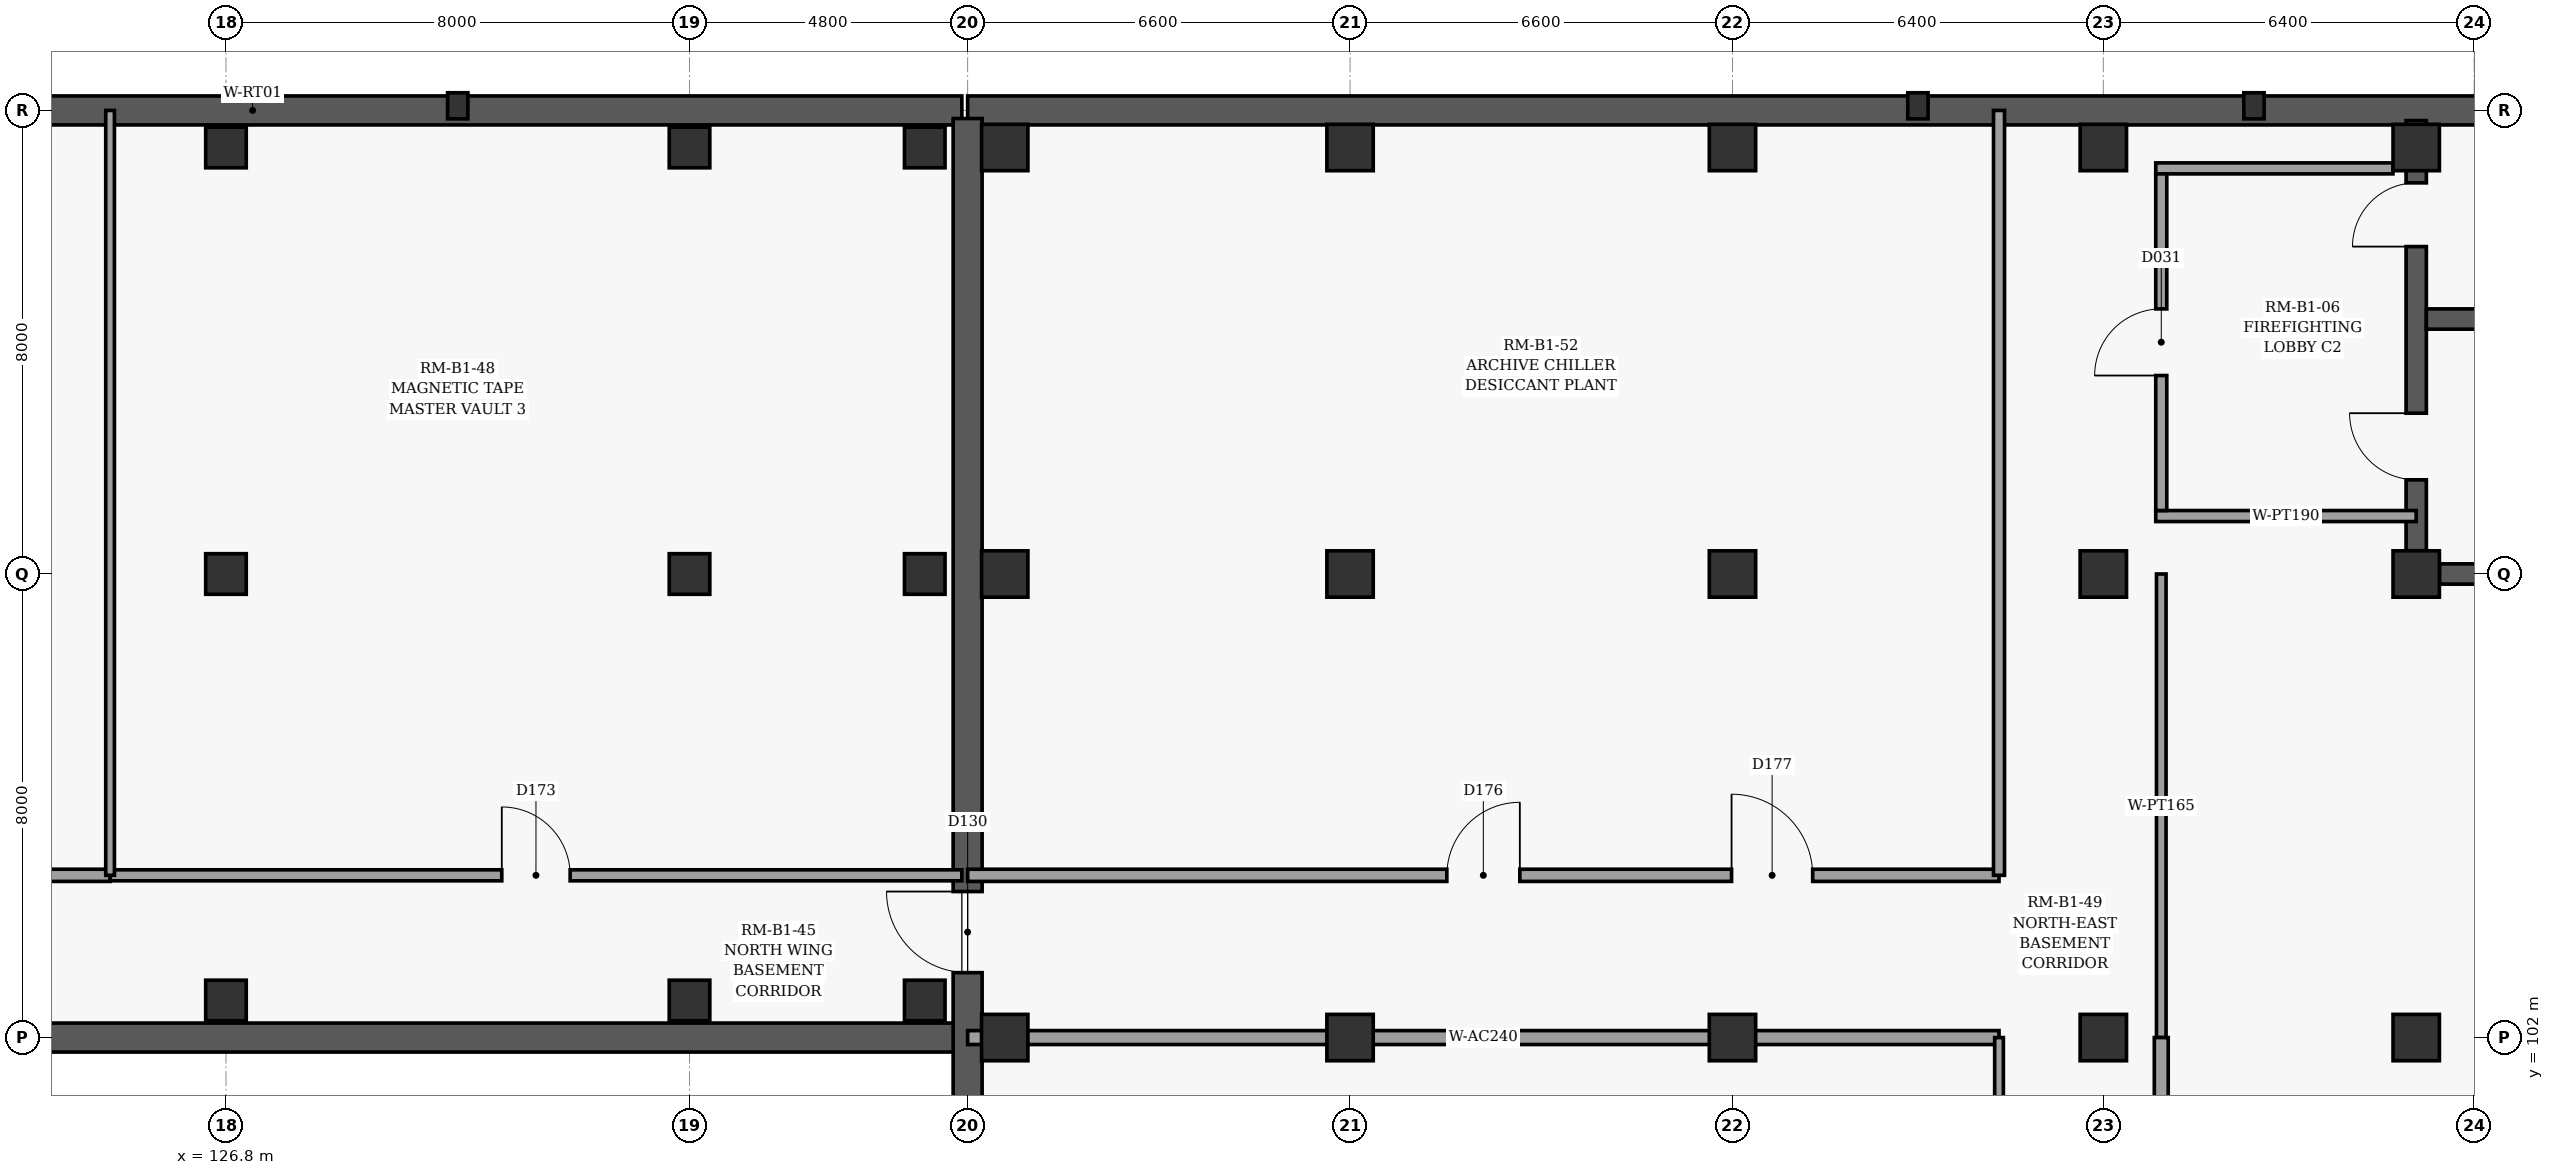
"""IFC4 building model, lengths in metres.
Left out: names, types, materials, properties, quantities, classifications, styles, units other than length and angle.
Written with IfcOpenShell. Run it as: python <this file> out.ifc"""

import sys

from ifc_helpers import new_model, si_unit, direction, frame, frame_2d, origin, origin_2d, place, context, subcontext, project, spatial, rectangle, extrude, element, fill, save


model = new_model("IFC4")
c1 = context("Model", 3, precision=1e-05, world=origin(), true_north=direction((0.0, 1.0)))
c2 = subcontext(c1, "Body", "Model", "MODEL_VIEW")
j1 = project(units=[si_unit("LENGTHUNIT", "METRE"), si_unit("PLANEANGLEUNIT", "RADIAN")], contexts=[c1])
p1 = place(None, origin())
s1 = spatial("IfcSite", under=j1, at=p1, CompositionType="ELEMENT")
p2 = place(p1, origin())
s2 = spatial("IfcBuilding", under=s1, at=p2, CompositionType="ELEMENT")
p3 = place(p2, frame((0.0, 0.0, -4.8)))
s3 = spatial("IfcBuildingStorey", under=s2, at=p3, CompositionType="ELEMENT", Elevation=-4.8)
for number, where, z_axis, x_axis in (
    (1, (126.8, 102.64, 0.0), (0.0, 0.0, 1.0), (1.0, 0.0, 0.0)),
    (2, (126.8, 110.0, 0.0), (0.0, 0.0, 1.0), (1.0, 0.0, 0.0)),
    (3, (126.8, 117.36, 0.0), (0.0, 0.0, 1.0), (1.0, 0.0, 0.0)),
    (4, (134.8, 102.64, 0.0), (0.0, 0.0, 1.0), (1.0, 0.0, 0.0)),
    (5, (134.8, 110.0, 0.0), (0.0, 0.0, 1.0), (1.0, 0.0, 0.0)),
    (6, (134.8, 117.36, 0.0), (0.0, 0.0, 1.0), (1.0, 0.0, 0.0)),
    (7, (138.86, 102.64, 0.0), (0.0, 0.0, 1.0), (1.0, 0.0, 0.0)),
    (8, (138.86, 110.0, 0.0), (0.0, 0.0, 1.0), (1.0, 0.0, 0.0)),
    (9, (138.86, 117.36, 0.0), (0.0, 0.0, 1.0), (1.0, 0.0, 0.0)),
):
    element("IfcColumn", number, at=place(p3, frame(where, z_axis=z_axis, x_axis=x_axis)), inside=s3, PredefinedType="COLUMN", context=c2, shape_type="SweptSolid", body=[
        extrude(rectangle(XDim=0.7, YDim=0.7, at=origin_2d()), origin(), (0.0, 0.0, 1.0), 4.8),
    ])
for number, where, z_axis, x_axis in (
    (10, (140.24, 102.0, 0.0), (0.0, 0.0, 1.0), (1.0, 0.0, 0.0)),
    (11, (140.24, 110.0, 0.0), (0.0, 0.0, 1.0), (1.0, 0.0, 0.0)),
    (12, (140.24, 117.36, 0.0), (0.0, 0.0, 1.0), (1.0, 0.0, 0.0)),
    (13, (146.2, 102.0, 0.0), (0.0, 0.0, 1.0), (1.0, 0.0, 0.0)),
    (14, (146.2, 110.0, 0.0), (0.0, 0.0, 1.0), (1.0, 0.0, 0.0)),
    (15, (146.2, 117.36, 0.0), (0.0, 0.0, 1.0), (1.0, 0.0, 0.0)),
    (16, (152.8, 102.0, 0.0), (0.0, 0.0, 1.0), (1.0, 0.0, 0.0)),
    (17, (152.8, 110.0, 0.0), (0.0, 0.0, 1.0), (1.0, 0.0, 0.0)),
    (18, (152.8, 117.36, 0.0), (0.0, 0.0, 1.0), (1.0, 0.0, 0.0)),
    (19, (159.2, 102.0, 0.0), (0.0, 0.0, 1.0), (1.0, 0.0, 0.0)),
    (20, (159.2, 110.0, 0.0), (0.0, 0.0, 1.0), (1.0, 0.0, 0.0)),
    (21, (159.2, 117.36, 0.0), (0.0, 0.0, 1.0), (1.0, 0.0, 0.0)),
    (22, (164.6, 102.0, 0.0), (0.0, 0.0, 1.0), (1.0, 0.0, 0.0)),
    (23, (164.6, 110.0, 0.0), (0.0, 0.0, 1.0), (1.0, 0.0, 0.0)),
    (24, (164.6, 117.36, 0.0), (0.0, 0.0, 1.0), (1.0, 0.0, 0.0)),
):
    element("IfcColumn", number, at=place(p3, frame(where, z_axis=z_axis, x_axis=x_axis)), inside=s3, PredefinedType="COLUMN", context=c2, shape_type="SweptSolid", body=[
        extrude(rectangle(XDim=0.8, YDim=0.8, at=origin_2d()), origin(), (0.0, 0.0, 1.0), 4.8),
    ])
p4 = place(p3, frame((130.8, 118.08, -0.5), z_axis=(0.0, 0.0, 1.0), x_axis=(0.0, 1.0, 0.0)))
e25 = element("IfcColumn", 25, at=p4, inside=s3, PredefinedType="PILASTER", context=c2, shape_type="SweptSolid", body=[
    extrude(rectangle(XDim=0.35, YDim=0.45, at=origin_2d()), origin(), (0.0, 0.0, 1.0), 5.3),
])
for number, where, z_axis, x_axis in (
    (26, (156.0, 118.08, -0.48), (0.0, 0.0, 1.0), (0.0, 1.0, 0.0)),
    (27, (161.8, 118.08, -0.48), (0.0, 0.0, 1.0), (0.0, 1.0, 0.0)),
):
    element("IfcColumn", number, at=place(p3, frame(where, z_axis=z_axis, x_axis=x_axis)), inside=s3, PredefinedType="PILASTER", context=c2, shape_type="SweptSolid", body=[
        extrude(rectangle(XDim=0.35, YDim=0.45, at=origin_2d()), origin(), (0.0, 0.0, 1.0), 5.28),
    ])
for number, where, z_axis, x_axis in (
    (28, (94.8, 118.0, 0.0), (0.0, 0.0, 1.0), (1.0, 0.0, 0.0)),
    (29, (139.5, 102.0, 0.0), (0.0, 0.0, 1.0), (-1.0, 0.0, 0.0)),
):
    element("IfcWall", number, at=place(p3, frame(where, z_axis=z_axis, x_axis=x_axis)), inside=s3, PredefinedType="USERDEFINED", context=c2, shape_type="SweptSolid", body=[
        extrude(rectangle(XDim=44.7, YDim=0.5, at=frame_2d((22.35, 0.0))), origin(), (0.0, 0.0, 1.0), 4.45),
    ])
p5 = place(p3, frame((139.6, 118.0, 0.0), z_axis=(0.0, 0.0, 1.0), x_axis=(1.0, 0.0, 0.0)))
e30 = element("IfcWall", 30, at=p5, inside=s3, PredefinedType="USERDEFINED", context=c2, shape_type="SweptSolid", body=[
    extrude(rectangle(XDim=32.4, YDim=0.5, at=frame_2d((16.2, 0.0))), origin(), (0.0, 0.0, 1.0), 4.5),
])
p6 = place(p3, frame((139.6, 71.74, 0.0), z_axis=(0.0, 0.0, 1.0), x_axis=(0.0, 1.0, 0.0)))
e31 = element("IfcWall", 31, at=p6, inside=s3, PredefinedType="USERDEFINED", context=c2, shape_type="SweptSolid", body=[
    extrude(rectangle(XDim=46.12, YDim=0.5, at=frame_2d((23.06, 0.0))), origin(), (0.0, 0.0, 1.0), 3.67),
])
p7 = place(p6, frame((31.38, 0.0, 0.0)))
e32 = element("IfcOpeningElement", 32, at=p7, cuts=e31, PredefinedType="OPENING", context=c2, shape_type="SweptSolid", body=[
    extrude(rectangle(XDim=1.4, YDim=2.25, at=frame_2d((0.7, 1.125))), frame((0.0, 0.26, 0.0), z_axis=(0.0, -1.0, 0.0), x_axis=(1.0, 0.0, 0.0)), (0.0, 0.0, 1.0), 0.52),
])
p8 = place(p3, frame((165.002, 110.0, 0.0), z_axis=(0.0, 0.0, 1.0), x_axis=(1.0, 0.0, 0.0)))
e33 = element("IfcWall", 33, at=p8, inside=s3, PredefinedType="SHEAR", context=c2, shape_type="SweptSolid", body=[
    extrude(rectangle(XDim=7.173, YDim=0.35, at=frame_2d((3.586, 0.0))), origin(), (0.0, 0.0, 1.0), 4.5),
])
p9 = place(p3, frame((164.6, 110.402, 0.0), z_axis=(0.0, 0.0, 1.0), x_axis=(0.0, 1.0, 0.0)))
e34 = element("IfcWall", 34, at=p9, inside=s3, PredefinedType="SHEAR", context=c2, shape_type="SweptSolid", body=[
    extrude(rectangle(XDim=7.423, YDim=0.35, at=frame_2d((3.711, 0.0))), origin(), (0.0, 0.0, 1.0), 4.5),
])
p10 = place(p9, frame((5.248, 0.0, 0.0)))
e35 = element("IfcOpeningElement", 35, at=p10, cuts=e34, PredefinedType="OPENING", context=c2, shape_type="SweptSolid", body=[
    extrude(rectangle(XDim=1.1, YDim=2.15, at=frame_2d((0.55, 1.075))), frame((0.0, 0.185, 0.0), z_axis=(0.0, -1.0, 0.0), x_axis=(1.0, 0.0, 0.0)), (0.0, 0.0, 1.0), 0.37),
])
p11 = place(p9, frame((1.223, 0.0, 0.0)))
e36 = element("IfcOpeningElement", 36, at=p11, cuts=e34, PredefinedType="OPENING", context=c2, shape_type="SweptSolid", body=[
    extrude(rectangle(XDim=1.15, YDim=2.2, at=frame_2d((0.575, 1.1))), frame((0.0, 0.185, 0.0), z_axis=(0.0, -1.0, 0.0), x_axis=(1.0, 0.0, 0.0)), (0.0, 0.0, 1.0), 0.37),
])
p12 = place(p3, frame((164.775, 114.4, 0.0), z_axis=(0.0, 0.0, 1.0), x_axis=(1.0, 0.0, 0.0)))
e37 = element("IfcWall", 37, at=p12, inside=s3, PredefinedType="SHEAR", context=c2, shape_type="SweptSolid", body=[
    extrude(rectangle(XDim=7.05, YDim=0.35, at=frame_2d((3.525, 0.0))), origin(), (0.0, 0.0, 1.0), 4.5),
])
p13 = place(p3, frame((160.105, 111.0, 0.0), z_axis=(0.0, 0.0, 1.0), x_axis=(1.0, 0.0, 0.0)))
e38 = element("IfcWall", 38, at=p13, inside=s3, PredefinedType="PARTITIONING", context=c2, shape_type="SweptSolid", body=[
    extrude(rectangle(XDim=4.495, YDim=0.19, at=frame_2d((2.248, 0.0))), origin(), (0.0, 0.0, 1.0), 4.5),
])
p14 = place(p3, frame((160.105, 117.0, 0.0), z_axis=(0.0, 0.0, 1.0), x_axis=(1.0, 0.0, 0.0)))
e39 = element("IfcWall", 39, at=p14, inside=s3, PredefinedType="PARTITIONING", context=c2, shape_type="SweptSolid", body=[
    extrude(rectangle(XDim=4.093, YDim=0.19, at=frame_2d((2.046, 0.0))), origin(), (0.0, 0.0, 1.0), 3.85),
])
p15 = place(p3, frame((160.2, 111.095, 0.0), z_axis=(0.0, 0.0, 1.0), x_axis=(0.0, 1.0, 0.0)))
e40 = element("IfcWall", 40, at=p15, inside=s3, PredefinedType="PARTITIONING", context=c2, shape_type="SweptSolid", body=[
    extrude(rectangle(XDim=5.81, YDim=0.19, at=frame_2d((2.905, 0.0))), origin(), (0.0, 0.0, 1.0), 4.5),
])
p16 = place(p15, frame((2.33, 0.0, 0.0)))
e41 = element("IfcOpeningElement", 41, at=p16, cuts=e40, PredefinedType="OPENING", context=c2, shape_type="SweptSolid", body=[
    extrude(rectangle(XDim=1.15, YDim=2.2, at=frame_2d((0.575, 1.1))), frame((0.0, 0.105, 0.0), z_axis=(0.0, -1.0, 0.0), x_axis=(1.0, 0.0, 0.0)), (0.0, 0.0, 1.0), 0.21),
])
p17 = place(p3, frame((109.8, 104.8, 0.0), z_axis=(0.0, 0.0, 1.0), x_axis=(1.0, 0.0, 0.0)))
e42 = element("IfcWall", 42, at=p17, inside=s3, PredefinedType="PARTITIONING", context=c2, shape_type="SweptSolid", body=[
    extrude(rectangle(XDim=15.0, YDim=0.21, at=frame_2d((7.5, 0.0))), origin(), (0.0, 0.0, 1.0), 4.45),
])
p18 = place(p17, frame((6.94, 0.0, 0.0)))
e43 = element("IfcOpeningElement", 43, at=p18, cuts=e42, PredefinedType="OPENING", context=c2, shape_type="SweptSolid", body=[
    extrude(rectangle(XDim=1.12, YDim=2.15, at=frame_2d((0.56, 1.075))), frame((0.0, 0.115, 0.0), z_axis=(0.0, -1.0, 0.0), x_axis=(1.0, 0.0, 0.0)), (0.0, 0.0, 1.0), 0.23),
])
p19 = place(p3, frame((124.8, 104.8, 0.0), z_axis=(0.0, 0.0, 1.0), x_axis=(1.0, 0.0, 0.0)))
e44 = element("IfcWall", 44, at=p19, inside=s3, PredefinedType="PARTITIONING", context=c2, shape_type="SweptSolid", body=[
    extrude(rectangle(XDim=14.7, YDim=0.19, at=frame_2d((7.35, 0.0))), origin(), (0.0, 0.0, 1.0), 4.45),
])
p20 = place(p19, frame((6.76, 0.0, 0.0)))
e45 = element("IfcOpeningElement", 45, at=p20, cuts=e44, PredefinedType="OPENING", context=c2, shape_type="SweptSolid", body=[
    extrude(rectangle(XDim=1.18, YDim=2.15, at=frame_2d((0.59, 1.075))), frame((0.0, 0.105, 0.0), z_axis=(0.0, -1.0, 0.0), x_axis=(1.0, 0.0, 0.0)), (0.0, 0.0, 1.0), 0.21),
])
p21 = place(p3, frame((124.8, 118.0, 0.0), z_axis=(0.0, 0.0, 1.0), x_axis=(0.0, -1.0, 0.0)))
e46 = element("IfcWall", 46, at=p21, inside=s3, PredefinedType="PARTITIONING", context=c2, shape_type="SweptSolid", body=[
    extrude(rectangle(XDim=13.2, YDim=0.15, at=frame_2d((6.6, 0.0))), origin(), (0.0, 0.0, 1.0), 4.45),
])
p22 = place(p3, frame((157.4, 102.0, 0.0), z_axis=(0.0, 0.0, 1.0), x_axis=(-1.0, 0.0, 0.0)))
e47 = element("IfcWall", 47, at=p22, inside=s3, PredefinedType="PARTITIONING", context=c2, shape_type="SweptSolid", body=[
    extrude(rectangle(XDim=17.8, YDim=0.24, at=frame_2d((8.9, 0.0))), origin(), (0.0, 0.0, 1.0), 3.85),
])
p23 = place(p3, frame((139.6, 104.8, 0.0), z_axis=(0.0, 0.0, 1.0), x_axis=(1.0, 0.0, 0.0)))
e48 = element("IfcWall", 48, at=p23, inside=s3, PredefinedType="PARTITIONING", context=c2, shape_type="SweptSolid", body=[
    extrude(rectangle(XDim=17.8, YDim=0.21, at=frame_2d((8.9, 0.0))), origin(), (0.0, 0.0, 1.0), 4.5),
])
p24 = place(p23, frame((8.27, 0.0, 0.0)))
e49 = element("IfcOpeningElement", 49, at=p24, cuts=e48, PredefinedType="OPENING", context=c2, shape_type="SweptSolid", body=[
    extrude(rectangle(XDim=1.26, YDim=2.2, at=frame_2d((0.63, 1.1))), frame((0.0, 0.115, 0.0), z_axis=(0.0, -1.0, 0.0), x_axis=(1.0, 0.0, 0.0)), (0.0, 0.0, 1.0), 0.23),
])
p25 = place(p23, frame((13.184, 0.0, 0.0)))
e50 = element("IfcOpeningElement", 50, at=p25, cuts=e48, PredefinedType="OPENING", context=c2, shape_type="SweptSolid", body=[
    extrude(rectangle(XDim=1.4, YDim=2.25, at=frame_2d((0.7, 1.125))), frame((0.0, 0.115, 0.0), z_axis=(0.0, -1.0, 0.0), x_axis=(1.0, 0.0, 0.0)), (0.0, 0.0, 1.0), 0.23),
])
p26 = place(p3, frame((157.4, 104.8, 0.0), z_axis=(0.0, 0.0, 1.0), x_axis=(0.0, 1.0, 0.0)))
e51 = element("IfcWall", 51, at=p26, inside=s3, PredefinedType="PARTITIONING", context=c2, shape_type="SweptSolid", body=[
    extrude(rectangle(XDim=13.2, YDim=0.19, at=frame_2d((6.6, 0.0))), origin(), (0.0, 0.0, 1.0), 4.5),
])
p27 = place(p3, frame((160.2, 110.0, 0.0), z_axis=(0.0, 0.0, 1.0), x_axis=(0.0, -1.0, 0.0)))
e52 = element("IfcWall", 52, at=p27, inside=s3, PredefinedType="PARTITIONING", context=c2, shape_type="SweptSolid", body=[
    extrude(rectangle(XDim=8.0, YDim=0.165, at=frame_2d((4.0, 0.0))), origin(), (0.0, 0.0, 1.0), 4.5),
])
p28 = place(p3, frame((157.4, 71.6, 0.0), z_axis=(0.0, 0.0, 1.0), x_axis=(0.0, 1.0, 0.0)))
e53 = element("IfcWall", 53, at=p28, inside=s3, PredefinedType="PARTITIONING", context=c2, shape_type="SweptSolid", body=[
    extrude(rectangle(XDim=30.4, YDim=0.15, at=frame_2d((15.2, 0.0))), origin(), (0.0, 0.0, 1.0), 4.5),
])
p29 = place(p28, frame((14.18, 0.0, 0.0)))
e54 = element("IfcOpeningElement", 54, at=p29, cuts=e53, PredefinedType="OPENING", context=c2, shape_type="SweptSolid", body=[
    extrude(rectangle(XDim=1.22, YDim=2.2, at=frame_2d((0.61, 1.1))), frame((0.0, 0.085, 0.0), z_axis=(0.0, -1.0, 0.0), x_axis=(1.0, 0.0, 0.0)), (0.0, 0.0, 1.0), 0.17),
])
p30 = place(p28, frame((23.102, 0.0, 0.0)))
e55 = element("IfcOpeningElement", 55, at=p30, cuts=e53, PredefinedType="OPENING", context=c2, shape_type="SweptSolid", body=[
    extrude(rectangle(XDim=1.22, YDim=2.2, at=frame_2d((0.61, 1.1))), frame((0.0, 0.085, 0.0), z_axis=(0.0, -1.0, 0.0), x_axis=(1.0, 0.0, 0.0)), (0.0, 0.0, 1.0), 0.17),
])
p31 = place(p3, frame((160.2, 102.0, 0.0), z_axis=(0.0, 0.0, 1.0), x_axis=(0.0, -1.0, 0.0)))
e56 = element("IfcWall", 56, at=p31, inside=s3, PredefinedType="PARTITIONING", context=c2, shape_type="SweptSolid", body=[
    extrude(rectangle(XDim=22.4, YDim=0.24, at=frame_2d((11.2, 0.0))), origin(), (0.0, 0.0, 1.0), 4.5),
])
p32 = place(p31, frame((10.55, 0.0, 0.0)))
e57 = element("IfcOpeningElement", 57, at=p32, cuts=e56, PredefinedType="OPENING", context=c2, shape_type="SweptSolid", body=[
    extrude(rectangle(XDim=1.3, YDim=2.2, at=frame_2d((0.65, 1.1))), frame((0.0, 0.13, 0.0), z_axis=(0.0, -1.0, 0.0), x_axis=(1.0, 0.0, 0.0)), (0.0, 0.0, 1.0), 0.26),
])
p33 = place(p31, frame((16.772, 0.0, 0.0)))
e58 = element("IfcOpeningElement", 58, at=p33, cuts=e56, PredefinedType="OPENING", context=c2, shape_type="SweptSolid", body=[
    extrude(rectangle(XDim=1.4, YDim=2.25, at=frame_2d((0.7, 1.125))), frame((0.0, 0.13, 0.0), z_axis=(0.0, -1.0, 0.0), x_axis=(1.0, 0.0, 0.0)), (0.0, 0.0, 1.0), 0.26),
])
p34 = place(p10, origin())
e59 = element("IfcDoor", 59, at=p34, inside=s3, OperationType="SINGLE_SWING_LEFT", PredefinedType="DOOR", context=c2, shape_type="SweptSolid", body=[
    extrude(rectangle(XDim=1.1, YDim=2.15, at=frame_2d((0.55, 1.075))), frame((0.0, 0.025, 0.0), z_axis=(0.0, -1.0, 0.0), x_axis=(1.0, 0.0, 0.0)), (0.0, 0.0, 1.0), 0.05),
])
fill(e35, e59)
p35 = place(p11, origin())
e60 = element("IfcDoor", 60, at=p35, inside=s3, OperationType="SINGLE_SWING_RIGHT", PredefinedType="DOOR", context=c2, shape_type="SweptSolid", body=[
    extrude(rectangle(XDim=1.15, YDim=2.2, at=frame_2d((0.575, 1.1))), frame((0.0, 0.025, 0.0), z_axis=(0.0, -1.0, 0.0), x_axis=(1.0, 0.0, 0.0)), (0.0, 0.0, 1.0), 0.05),
])
fill(e36, e60)
p36 = place(p16, origin())
e61 = element("IfcDoor", 61, at=p36, inside=s3, OperationType="SINGLE_SWING_LEFT", PredefinedType="DOOR", context=c2, shape_type="SweptSolid", body=[
    extrude(rectangle(XDim=1.15, YDim=2.2, at=frame_2d((0.575, 1.1))), frame((0.0, 0.025, 0.0), z_axis=(0.0, -1.0, 0.0), x_axis=(1.0, 0.0, 0.0)), (0.0, 0.0, 1.0), 0.05),
])
fill(e41, e61)
p37 = place(p7, origin())
e62 = element("IfcDoor", 62, at=p37, inside=s3, OperationType="SINGLE_SWING_RIGHT", PredefinedType="DOOR", context=c2, shape_type="SweptSolid", body=[
    extrude(rectangle(XDim=1.4, YDim=2.25, at=frame_2d((0.7, 1.125))), frame((0.0, 0.025, 0.0), z_axis=(0.0, -1.0, 0.0), x_axis=(1.0, 0.0, 0.0)), (0.0, 0.0, 1.0), 0.05),
])
fill(e32, e62)
p38 = place(p20, origin())
e63 = element("IfcDoor", 63, at=p38, inside=s3, OperationType="SINGLE_SWING_LEFT", PredefinedType="DOOR", context=c2, shape_type="SweptSolid", body=[
    extrude(rectangle(XDim=1.18, YDim=2.15, at=frame_2d((0.59, 1.075))), frame((0.0, 0.025, 0.0), z_axis=(0.0, -1.0, 0.0), x_axis=(1.0, 0.0, 0.0)), (0.0, 0.0, 1.0), 0.05),
])
fill(e45, e63)
p39 = place(p24, origin())
e64 = element("IfcDoor", 64, at=p39, inside=s3, OperationType="SINGLE_SWING_RIGHT", PredefinedType="DOOR", context=c2, shape_type="SweptSolid", body=[
    extrude(rectangle(XDim=1.26, YDim=2.2, at=frame_2d((0.63, 1.1))), frame((0.0, 0.025, 0.0), z_axis=(0.0, -1.0, 0.0), x_axis=(1.0, 0.0, 0.0)), (0.0, 0.0, 1.0), 0.05),
])
fill(e49, e64)
p40 = place(p25, origin())
e65 = element("IfcDoor", 65, at=p40, inside=s3, OperationType="SINGLE_SWING_LEFT", PredefinedType="DOOR", context=c2, shape_type="SweptSolid", body=[
    extrude(rectangle(XDim=1.4, YDim=2.25, at=frame_2d((0.7, 1.125))), frame((0.0, 0.025, 0.0), z_axis=(0.0, -1.0, 0.0), x_axis=(1.0, 0.0, 0.0)), (0.0, 0.0, 1.0), 0.05),
])
fill(e50, e65)
save(model, sys.argv[1])
